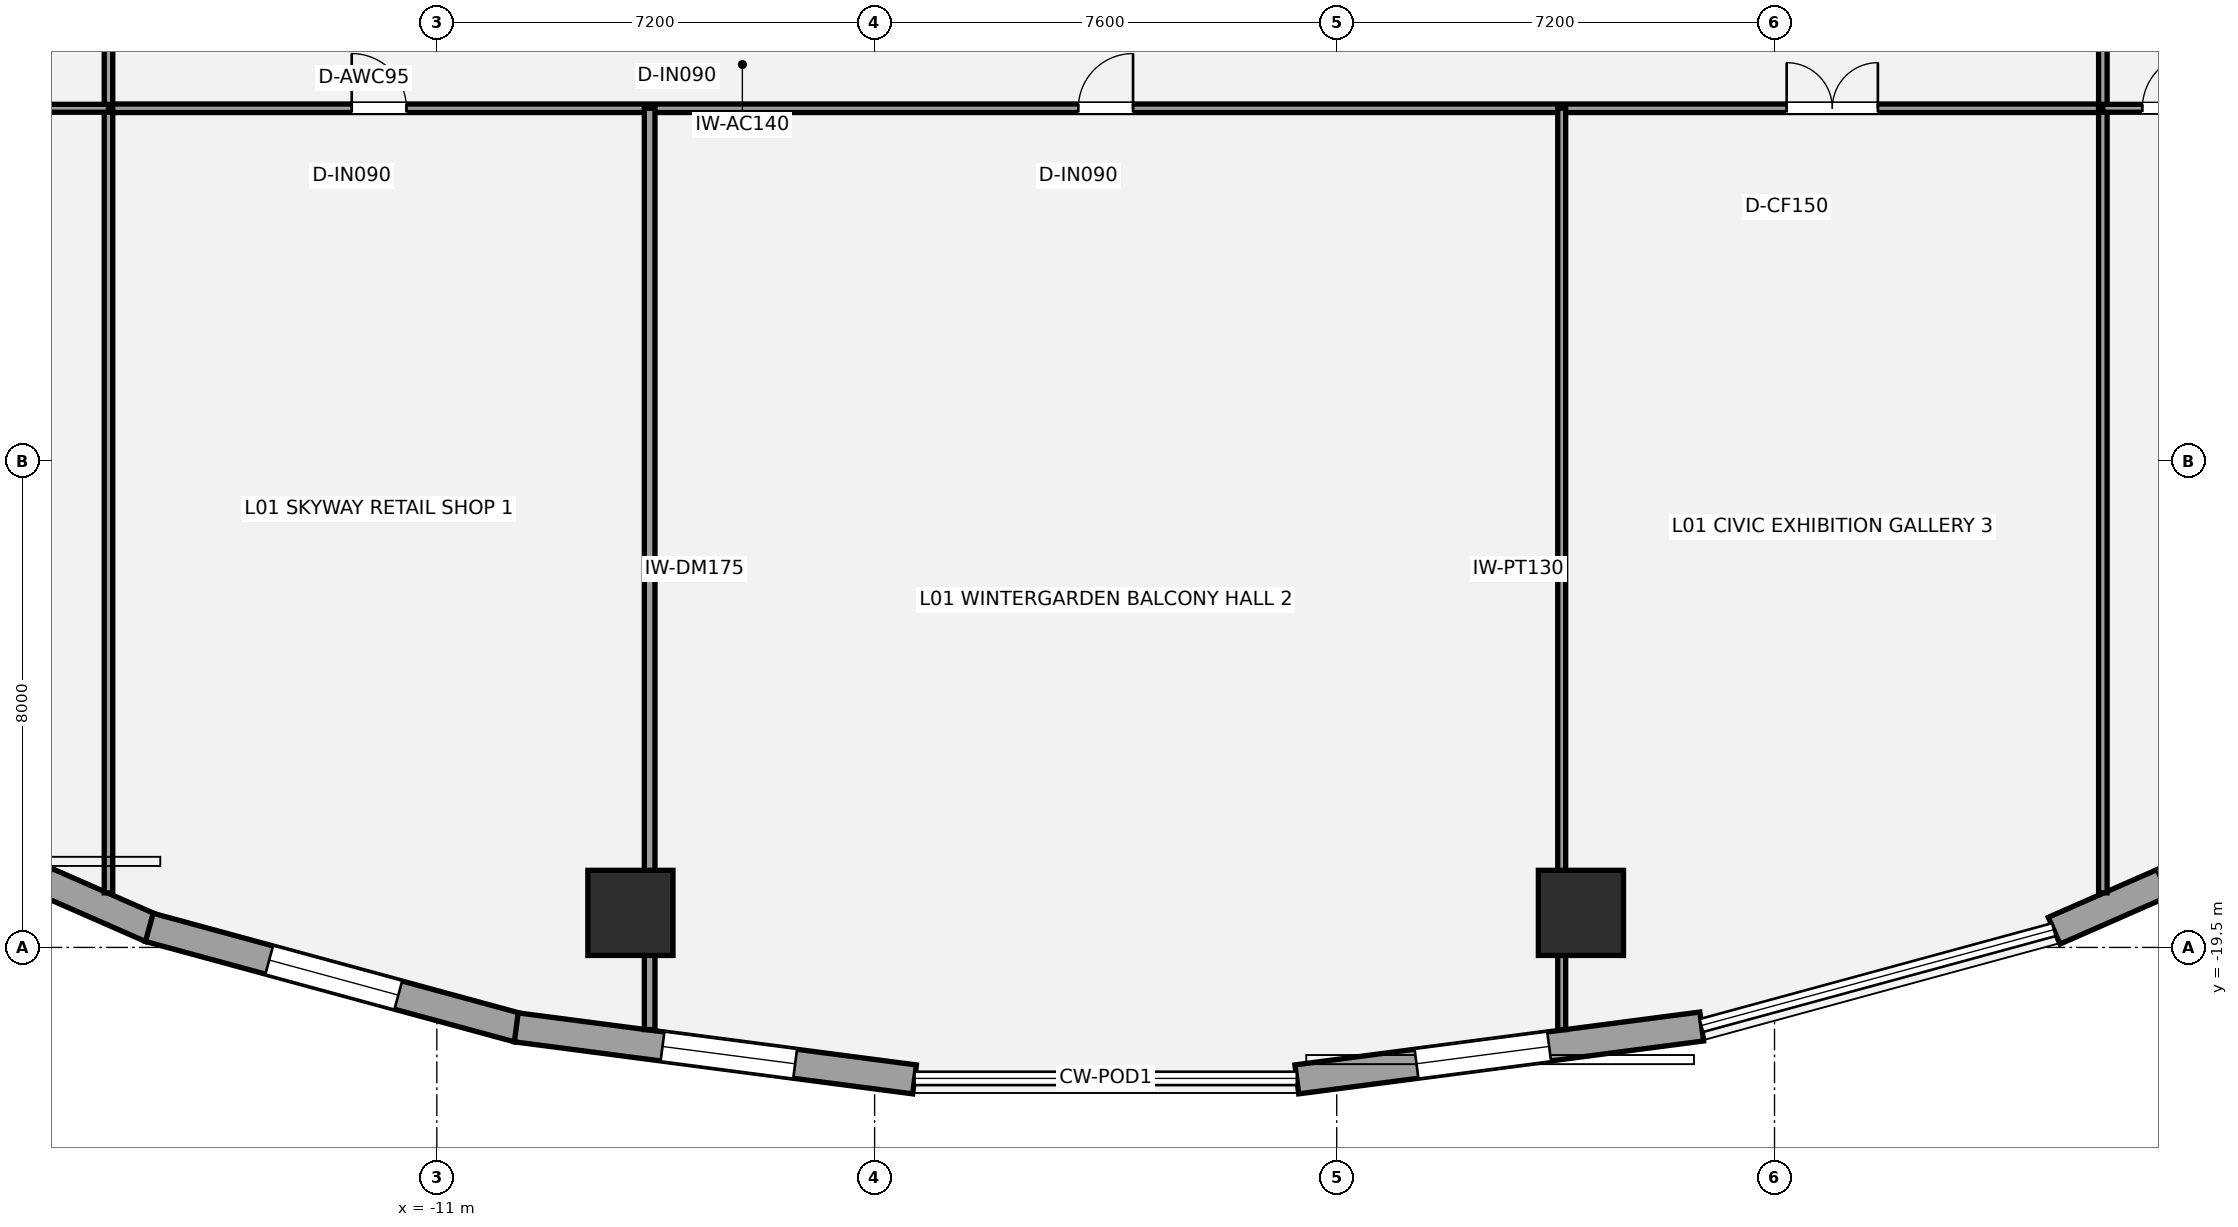
"""IFC4 building model, lengths in metres.
Left out: names, types, materials, properties, quantities, classifications, styles, units other than length and angle.
Written with IfcOpenShell. Run it as: python <this file> out.ifc"""

import sys

from ifc_helpers import new_model, si_unit, direction, frame, frame_2d, origin, origin_2d, place, context, subcontext, project, spatial, rectangle, hollow_circle, extrude, element, fill, save


model = new_model("IFC4")
c1 = context("Model", 3, precision=1e-05, world=origin(), true_north=direction((0.0, 1.0)))
c2 = subcontext(c1, "Body", "Model", "MODEL_VIEW")
j1 = project(units=[si_unit("LENGTHUNIT", "METRE"), si_unit("PLANEANGLEUNIT", "RADIAN")], contexts=[c1])
p1 = place(None, origin())
s1 = spatial("IfcSite", under=j1, at=p1, CompositionType="ELEMENT")
p2 = place(p1, origin())
s2 = spatial("IfcBuilding", under=s1, at=p2, CompositionType="ELEMENT")
p3 = place(p2, frame((0.0, 0.0, 6.0)))
s3 = spatial("IfcBuildingStorey", under=s2, at=p3, CompositionType="ELEMENT", Elevation=6.0)
for number, where, z_axis, x_axis in (
    (1, (-7.816, -18.932, 0.0), (0.0, 0.0, 1.0), (1.0, 0.0, 0.0)),
    (2, (7.816, -18.932, 0.0), (0.0, 0.0, 1.0), (1.0, 0.0, 0.0)),
):
    element("IfcColumn", number, at=place(p3, frame(where, z_axis=z_axis, x_axis=x_axis)), inside=s3, PredefinedType="USERDEFINED", context=c2, shape_type="SweptSolid", body=[
        extrude(hollow_circle(Radius=0.7, WallThickness=0.05, at=origin_2d()), origin(), (0.0, 0.0, 1.0), 4.2),
    ])
p4 = place(p3, frame((-15.695, -19.183, 0.0), z_axis=(0.0, 0.0, 1.0), x_axis=(-0.91570760638, 0.401845218484, 0.0)))
e3 = element("IfcWall", 3, at=p4, inside=s3, PredefinedType="STANDARD", context=c2, shape_type="SweptSolid", body=[
    extrude(rectangle(XDim=5.963, YDim=0.48, at=frame_2d((2.981, 0.0))), origin(), (0.0, 0.0, 1.0), 3.109),
])
p5 = place(p4, frame((1.882, 0.0, 0.7)))
e4 = element("IfcOpeningElement", 4, at=p5, cuts=e3, PredefinedType="OPENING", context=c2, shape_type="SweptSolid", body=[
    extrude(rectangle(XDim=2.2, YDim=1.95, at=frame_2d((1.1, 0.975))), frame((0.0, 0.25, 0.0), z_axis=(0.0, -1.0, 0.0), x_axis=(1.0, 0.0, 0.0)), (0.0, 0.0, 1.0), 0.5),
])
p6 = place(p3, frame((-9.662, -20.821, 0.0), z_axis=(0.0, 0.0, 1.0), x_axis=(-0.964936550718, 0.262483243445, 0.0)))
e5 = element("IfcWall", 5, at=p6, inside=s3, PredefinedType="STANDARD", context=c2, shape_type="SweptSolid", body=[
    extrude(rectangle(XDim=6.288, YDim=0.48, at=frame_2d((3.144, 0.0))), origin(), (0.0, 0.0, 1.0), 3.109),
])
p7 = place(p6, frame((2.044, 0.0, 0.7)))
e6 = element("IfcOpeningElement", 6, at=p7, cuts=e5, PredefinedType="OPENING", context=c2, shape_type="SweptSolid", body=[
    extrude(rectangle(XDim=2.2, YDim=1.95, at=frame_2d((1.1, 0.975))), frame((0.0, 0.25, 0.0), z_axis=(0.0, -1.0, 0.0), x_axis=(1.0, 0.0, 0.0)), (0.0, 0.0, 1.0), 0.5),
])
p8 = place(p3, frame((-3.143, -21.67, 0.0), z_axis=(0.0, 0.0, 1.0), x_axis=(-0.991574010877, 0.129541425626, 0.0)))
e7 = element("IfcWall", 7, at=p8, inside=s3, PredefinedType="STANDARD", context=c2, shape_type="SweptSolid", body=[
    extrude(rectangle(XDim=6.606, YDim=0.48, at=frame_2d((3.303, 0.0))), origin(), (0.0, 0.0, 1.0), 3.109),
])
p9 = place(p8, frame((1.98, 0.0, 0.7)))
e8 = element("IfcOpeningElement", 8, at=p9, cuts=e7, PredefinedType="OPENING", context=c2, shape_type="SweptSolid", body=[
    extrude(rectangle(XDim=2.2, YDim=1.95, at=frame_2d((1.1, 0.975))), frame((0.0, 0.25, 0.0), z_axis=(0.0, -1.0, 0.0), x_axis=(1.0, 0.0, 0.0)), (0.0, 0.0, 1.0), 0.5),
])
p10 = place(p3, frame((9.802, -20.801, 0.0), z_axis=(0.0, 0.0, 1.0), x_axis=(-0.991575864932, -0.12952723298, 0.0)))
e9 = element("IfcWall", 9, at=p10, inside=s3, PredefinedType="STANDARD", context=c2, shape_type="SweptSolid", body=[
    extrude(rectangle(XDim=6.716, YDim=0.48, at=frame_2d((3.358, 0.0))), origin(), (0.0, 0.0, 1.0), 3.109),
])
p11 = place(p10, frame((2.531, 0.0, 0.7)))
e10 = element("IfcOpeningElement", 10, at=p11, cuts=e9, PredefinedType="OPENING", context=c2, shape_type="SweptSolid", body=[
    extrude(rectangle(XDim=2.2, YDim=1.95, at=frame_2d((1.1, 0.975))), frame((0.0, 0.25, 0.0), z_axis=(0.0, -1.0, 0.0), x_axis=(1.0, 0.0, 0.0)), (0.0, 0.0, 1.0), 0.5),
])
p12 = place(p3, frame((21.156, -16.786, 0.0), z_axis=(0.0, 0.0, 1.0), x_axis=(-0.915720949248, -0.401814811957, 0.0)))
e11 = element("IfcWall", 11, at=p12, inside=s3, PredefinedType="STANDARD", context=c2, shape_type="SweptSolid", body=[
    extrude(rectangle(XDim=6.068, YDim=0.48, at=frame_2d((3.034, 0.0))), origin(), (0.0, 0.0, 1.0), 3.109),
])
p13 = place(p12, frame((1.934, 0.0, 0.7)))
e12 = element("IfcOpeningElement", 12, at=p13, cuts=e11, PredefinedType="OPENING", context=c2, shape_type="SweptSolid", body=[
    extrude(rectangle(XDim=2.2, YDim=1.95, at=frame_2d((1.1, 0.975))), frame((0.0, 0.25, 0.0), z_axis=(0.0, -1.0, 0.0), x_axis=(1.0, 0.0, 0.0)), (0.0, 0.0, 1.0), 0.5),
])
p14 = place(p3, frame((-16.4, -5.7, 0.0), z_axis=(0.0, 0.0, 1.0), x_axis=(1.0, 0.0, 0.0)))
e13 = element("IfcWall", 13, at=p14, inside=s3, PredefinedType="PARTITIONING", context=c2, shape_type="SweptSolid", body=[
    extrude(rectangle(XDim=32.8, YDim=0.14, at=frame_2d((16.4, 0.0))), origin(), (0.0, 0.0, 1.0), 3.98),
])
p15 = place(p14, frame((4.0, 0.0, 0.0)))
e14 = element("IfcOpeningElement", 14, at=p15, cuts=e13, PredefinedType="OPENING", context=c2, shape_type="SweptSolid", body=[
    extrude(rectangle(XDim=0.9, YDim=2.1, at=frame_2d((0.45, 1.05))), frame((0.0, 0.08, 0.0), z_axis=(0.0, -1.0, 0.0), x_axis=(1.0, 0.0, 0.0)), (0.0, 0.0, 1.0), 0.16),
])
p16 = place(p14, frame((15.95, 0.0, 0.0)))
e15 = element("IfcOpeningElement", 15, at=p16, cuts=e13, PredefinedType="OPENING", context=c2, shape_type="SweptSolid", body=[
    extrude(rectangle(XDim=0.9, YDim=2.1, at=frame_2d((0.45, 1.05))), frame((0.0, 0.08, 0.0), z_axis=(0.0, -1.0, 0.0), x_axis=(1.0, 0.0, 0.0)), (0.0, 0.0, 1.0), 0.16),
])
p17 = place(p14, frame((27.6, 0.0, 0.0)))
e16 = element("IfcOpeningElement", 16, at=p17, cuts=e13, PredefinedType="OPENING", context=c2, shape_type="SweptSolid", body=[
    extrude(rectangle(XDim=1.5, YDim=2.15, at=frame_2d((0.75, 1.075))), frame((0.0, 0.08, 0.0), z_axis=(0.0, -1.0, 0.0), x_axis=(1.0, 0.0, 0.0)), (0.0, 0.0, 1.0), 0.16),
])
p18 = place(p3, frame((-16.4, -18.603, 0.0), z_axis=(0.0, 0.0, 1.0), x_axis=(0.0, 1.0, 0.0)))
e17 = element("IfcWall", 17, at=p18, inside=s3, PredefinedType="PARTITIONING", context=c2, shape_type="SweptSolid", body=[
    extrude(rectangle(XDim=26.153, YDim=0.14, at=frame_2d((13.076, 0.0))), origin(), (0.0, 0.0, 1.0), 3.348),
])
p19 = place(p18, frame((14.802, 0.0, 0.0)))
e18 = element("IfcOpeningElement", 18, at=p19, cuts=e17, PredefinedType="OPENING", context=c2, shape_type="SweptSolid", body=[
    extrude(rectangle(XDim=0.9, YDim=2.1, at=frame_2d((0.45, 1.05))), frame((0.0, 0.08, 0.0), z_axis=(0.0, -1.0, 0.0), x_axis=(1.0, 0.0, 0.0)), (0.0, 0.0, 1.0), 0.16),
])
p20 = place(p18, frame((19.552, 0.0, 0.0)))
e19 = element("IfcOpeningElement", 19, at=p20, cuts=e17, PredefinedType="OPENING", context=c2, shape_type="SweptSolid", body=[
    extrude(rectangle(XDim=0.9, YDim=2.1, at=frame_2d((0.45, 1.05))), frame((0.0, 0.08, 0.0), z_axis=(0.0, -1.0, 0.0), x_axis=(1.0, 0.0, 0.0)), (0.0, 0.0, 1.0), 0.16),
])
p21 = place(p18, frame((23.827, 0.0, 0.0)))
e20 = element("IfcOpeningElement", 20, at=p21, cuts=e17, PredefinedType="OPENING", context=c2, shape_type="SweptSolid", body=[
    extrude(rectangle(XDim=0.9, YDim=2.1, at=frame_2d((0.45, 1.05))), frame((0.0, 0.08, 0.0), z_axis=(0.0, -1.0, 0.0), x_axis=(1.0, 0.0, 0.0)), (0.0, 0.0, 1.0), 0.16),
])
p22 = place(p3, frame((16.4, -18.603, 0.0), z_axis=(0.0, 0.0, 1.0), x_axis=(0.0, 1.0, 0.0)))
e21 = element("IfcWall", 21, at=p22, inside=s3, PredefinedType="PARTITIONING", context=c2, shape_type="SweptSolid", body=[
    extrude(rectangle(XDim=26.153, YDim=0.14, at=frame_2d((13.076, 0.0))), origin(), (0.0, 0.0, 1.0), 3.348),
])
p23 = place(p22, frame((14.802, 0.0, 0.0)))
e22 = element("IfcOpeningElement", 22, at=p23, cuts=e21, PredefinedType="OPENING", context=c2, shape_type="SweptSolid", body=[
    extrude(rectangle(XDim=0.9, YDim=2.1, at=frame_2d((0.45, 1.05))), frame((0.0, 0.08, 0.0), z_axis=(0.0, -1.0, 0.0), x_axis=(1.0, 0.0, 0.0)), (0.0, 0.0, 1.0), 0.16),
])
p24 = place(p22, frame((19.552, 0.0, 0.0)))
e23 = element("IfcOpeningElement", 23, at=p24, cuts=e21, PredefinedType="OPENING", context=c2, shape_type="SweptSolid", body=[
    extrude(rectangle(XDim=0.9, YDim=2.1, at=frame_2d((0.45, 1.05))), frame((0.0, 0.08, 0.0), z_axis=(0.0, -1.0, 0.0), x_axis=(1.0, 0.0, 0.0)), (0.0, 0.0, 1.0), 0.16),
])
p25 = place(p22, frame((23.827, 0.0, 0.0)))
e24 = element("IfcOpeningElement", 24, at=p25, cuts=e21, PredefinedType="OPENING", context=c2, shape_type="SweptSolid", body=[
    extrude(rectangle(XDim=0.9, YDim=2.1, at=frame_2d((0.45, 1.05))), frame((0.0, 0.08, 0.0), z_axis=(0.0, -1.0, 0.0), x_axis=(1.0, 0.0, 0.0)), (0.0, 0.0, 1.0), 0.16),
])
p26 = place(p3, frame((-7.5, -20.851, 0.0), z_axis=(0.0, 0.0, 1.0), x_axis=(0.0, 1.0, 0.0)))
e25 = element("IfcWall", 25, at=p26, inside=s3, PredefinedType="PARTITIONING", context=c2, shape_type="SweptSolid", body=[
    extrude(rectangle(XDim=15.151, YDim=0.175, at=frame_2d((7.576, 0.0))), origin(), (0.0, 0.0, 1.0), 3.348),
])
p27 = place(p3, frame((7.5, -20.851, 0.0), z_axis=(0.0, 0.0, 1.0), x_axis=(0.0, 1.0, 0.0)))
e26 = element("IfcWall", 26, at=p27, inside=s3, PredefinedType="PARTITIONING", context=c2, shape_type="SweptSolid", body=[
    extrude(rectangle(XDim=15.151, YDim=0.13, at=frame_2d((7.576, 0.0))), origin(), (0.0, 0.0, 1.0), 3.348),
])
p28 = place(p3, frame((-31.756, -5.7, 0.0), z_axis=(0.0, 0.0, 1.0), x_axis=(1.0, 0.0, 0.0)))
e27 = element("IfcWall", 27, at=p28, inside=s3, PredefinedType="PARTITIONING", context=c2, shape_type="SweptSolid", body=[
    extrude(rectangle(XDim=15.356, YDim=0.13, at=frame_2d((7.678, 0.0))), origin(), (0.0, 0.0, 1.0), 2.958),
])
p29 = place(p28, frame((0.39, 0.0, 0.0)))
e28 = element("IfcOpeningElement", 28, at=p29, cuts=e27, PredefinedType="OPENING", context=c2, shape_type="SweptSolid", body=[
    extrude(rectangle(XDim=0.9, YDim=2.1, at=frame_2d((0.45, 1.05))), frame((0.0, 0.075, 0.0), z_axis=(0.0, -1.0, 0.0), x_axis=(1.0, 0.0, 0.0)), (0.0, 0.0, 1.0), 0.15),
])
p30 = place(p3, frame((16.4, -5.7, 0.0), z_axis=(0.0, 0.0, 1.0), x_axis=(1.0, 0.0, 0.0)))
e29 = element("IfcWall", 29, at=p30, inside=s3, PredefinedType="PARTITIONING", context=c2, shape_type="SweptSolid", body=[
    extrude(rectangle(XDim=15.356, YDim=0.13, at=frame_2d((7.678, 0.0))), origin(), (0.0, 0.0, 1.0), 2.958),
])
p31 = place(p30, frame((0.65, 0.0, 0.0)))
e30 = element("IfcOpeningElement", 30, at=p31, cuts=e29, PredefinedType="OPENING", context=c2, shape_type="SweptSolid", body=[
    extrude(rectangle(XDim=0.9, YDim=2.1, at=frame_2d((0.45, 1.05))), frame((0.0, 0.075, 0.0), z_axis=(0.0, -1.0, 0.0), x_axis=(1.0, 0.0, 0.0)), (0.0, 0.0, 1.0), 0.15),
])
p32 = place(p7, origin())
e31 = element("IfcWindow", 31, at=p32, inside=s3, PartitioningType="SINGLE_PANEL", PredefinedType="WINDOW", context=c2, shape_type="SweptSolid", body=[
    extrude(rectangle(XDim=2.2, YDim=1.95, at=frame_2d((1.1, 0.975))), frame((0.0, -0.01, 0.0), z_axis=(0.0, -1.0, 0.0), x_axis=(1.0, 0.0, 0.0)), (0.0, 0.0, 1.0), 0.06),
])
fill(e6, e31)
p33 = place(p9, origin())
e32 = element("IfcWindow", 32, at=p33, inside=s3, PartitioningType="SINGLE_PANEL", PredefinedType="WINDOW", context=c2, shape_type="SweptSolid", body=[
    extrude(rectangle(XDim=2.2, YDim=1.95, at=frame_2d((1.1, 0.975))), frame((0.0, -0.01, 0.0), z_axis=(0.0, -1.0, 0.0), x_axis=(1.0, 0.0, 0.0)), (0.0, 0.0, 1.0), 0.06),
])
fill(e8, e32)
p34 = place(p11, origin())
e33 = element("IfcWindow", 33, at=p34, inside=s3, PartitioningType="SINGLE_PANEL", PredefinedType="WINDOW", context=c2, shape_type="SweptSolid", body=[
    extrude(rectangle(XDim=2.2, YDim=1.95, at=frame_2d((1.1, 0.975))), frame((0.0, -0.01, 0.0), z_axis=(0.0, -1.0, 0.0), x_axis=(1.0, 0.0, 0.0)), (0.0, 0.0, 1.0), 0.06),
])
fill(e10, e33)
p35 = place(p15, origin())
e34 = element("IfcDoor", 34, at=p35, inside=s3, OperationType="SINGLE_SWING_LEFT", PredefinedType="DOOR", context=c2, shape_type="SweptSolid", body=[
    extrude(rectangle(XDim=0.9, YDim=2.1, at=frame_2d((0.45, 1.05))), frame((0.0, 0.025, 0.0), z_axis=(0.0, -1.0, 0.0), x_axis=(1.0, 0.0, 0.0)), (0.0, 0.0, 1.0), 0.05),
])
fill(e14, e34)
p36 = place(p16, origin())
e35 = element("IfcDoor", 35, at=p36, inside=s3, OperationType="SINGLE_SWING_RIGHT", PredefinedType="DOOR", context=c2, shape_type="SweptSolid", body=[
    extrude(rectangle(XDim=0.9, YDim=2.1, at=frame_2d((0.45, 1.05))), frame((0.0, 0.025, 0.0), z_axis=(0.0, -1.0, 0.0), x_axis=(1.0, 0.0, 0.0)), (0.0, 0.0, 1.0), 0.05),
])
fill(e15, e35)
p37 = place(p17, origin())
e36 = element("IfcDoor", 36, at=p37, inside=s3, OperationType="DOUBLE_DOOR_SINGLE_SWING", PredefinedType="DOOR", context=c2, shape_type="SweptSolid", body=[
    extrude(rectangle(XDim=1.5, YDim=2.15, at=frame_2d((0.75, 1.075))), frame((0.0, 0.025, 0.0), z_axis=(0.0, -1.0, 0.0), x_axis=(1.0, 0.0, 0.0)), (0.0, 0.0, 1.0), 0.05),
])
fill(e16, e36)
p38 = place(p31, origin())
e37 = element("IfcDoor", 37, at=p38, inside=s3, OperationType="SINGLE_SWING_RIGHT", PredefinedType="DOOR", context=c2, shape_type="SweptSolid", body=[
    extrude(rectangle(XDim=0.9, YDim=2.1, at=frame_2d((0.45, 1.05))), frame((0.0, 0.025, 0.0), z_axis=(0.0, -1.0, 0.0), x_axis=(1.0, 0.0, 0.0)), (0.0, 0.0, 1.0), 0.05),
])
fill(e30, e37)
save(model, sys.argv[1])
